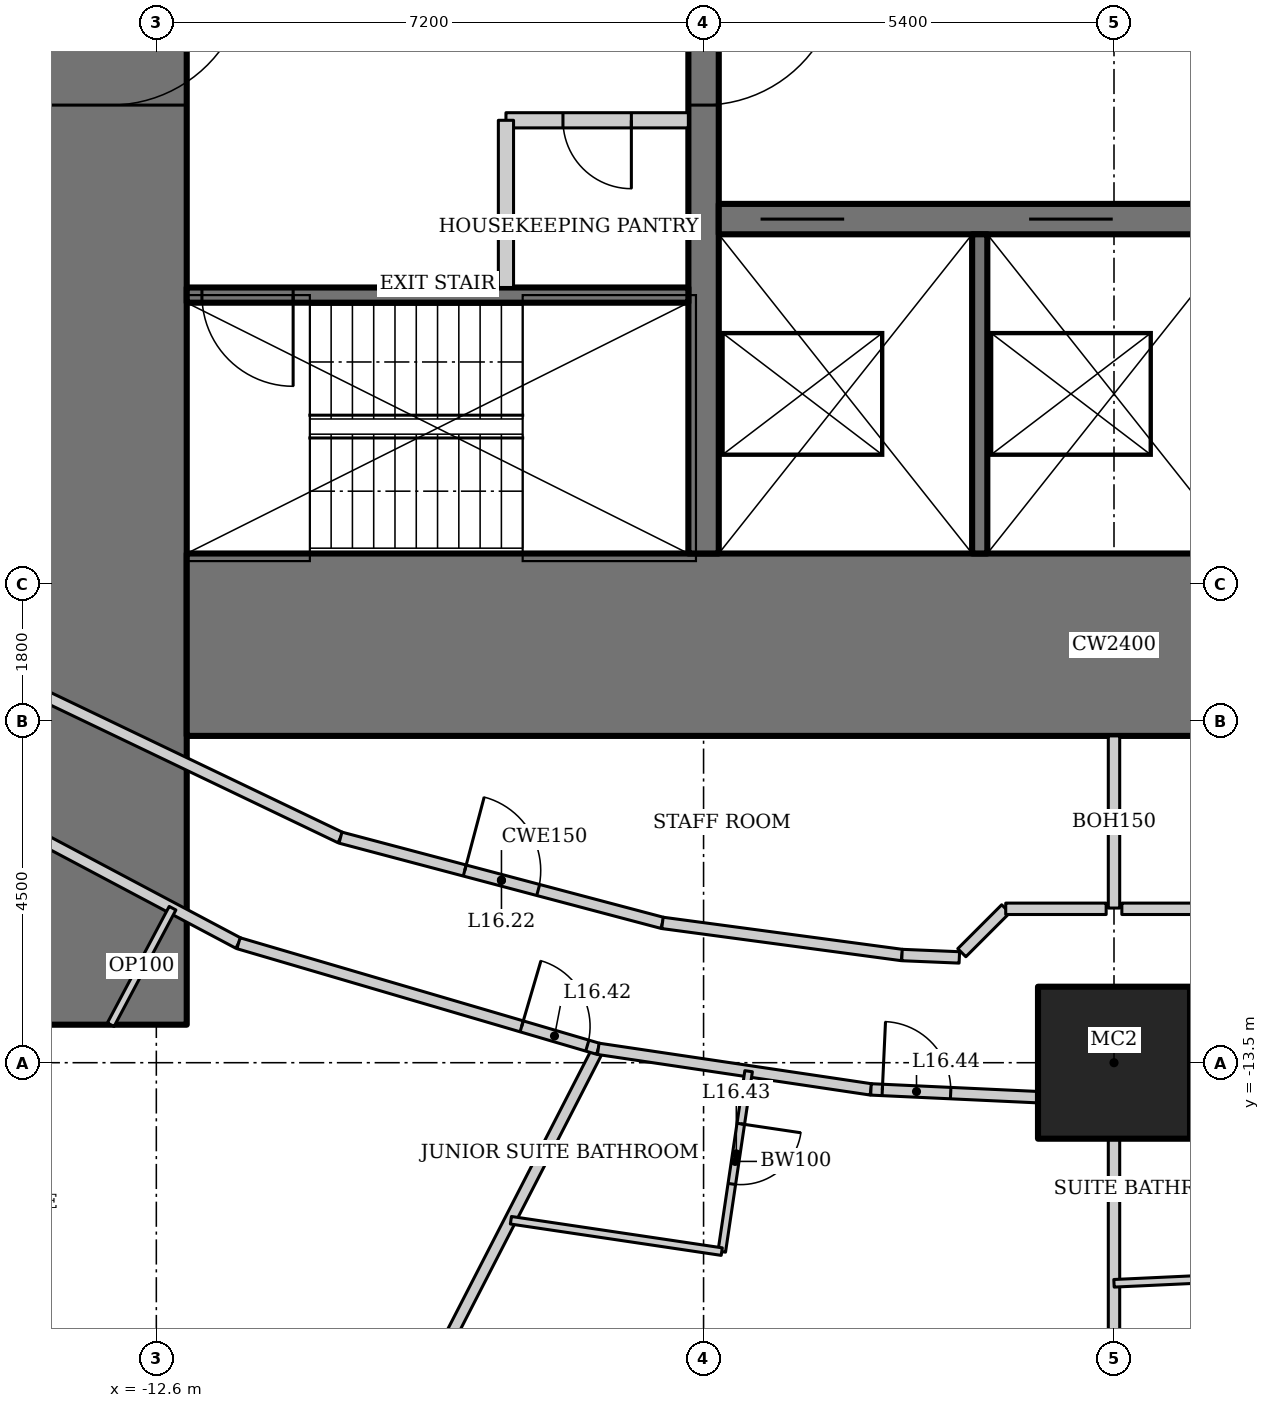
"""IFC4 building model, lengths in metres.
Left out: names, types, materials, properties, quantities, classifications, styles, units other than length and angle.
Written with IfcOpenShell. Run it as: python <this file> out.ifc"""

import sys

from ifc_helpers import new_model, si_unit, direction, frame, frame_2d, origin, origin_2d, place, context, subcontext, project, spatial, rectangle, hollow_rectangle, extrude, element, fill, save


model = new_model("IFC4")
c1 = context("Model", 3, precision=1e-05, world=origin(), true_north=direction((0.0, 1.0)))
c2 = subcontext(c1, "Body", "Model", "MODEL_VIEW")
j1 = project(units=[si_unit("LENGTHUNIT", "METRE"), si_unit("PLANEANGLEUNIT", "RADIAN")], contexts=[c1])
p1 = place(None, origin())
s1 = spatial("IfcSite", under=j1, at=p1, CompositionType="ELEMENT")
p2 = place(p1, origin())
s2 = spatial("IfcBuilding", under=s1, at=p2, CompositionType="ELEMENT")
p3 = place(p2, frame((0.0, 0.0, 73.0)))
s3 = spatial("IfcBuildingStorey", under=s2, at=p3, CompositionType="ELEMENT", Elevation=73.0)
p4 = place(p3, frame((0.0, -13.5, 0.0), z_axis=(0.0, 0.0, 1.0), x_axis=(1.0, 0.0, 0.0)))
e1 = element("IfcColumn", 1, at=p4, inside=s3, PredefinedType="COLUMN", context=c2, shape_type="SweptSolid", body=[
    extrude(hollow_rectangle(XDim=2.0, YDim=2.0, WallThickness=0.17, at=origin_2d()), origin(), (0.0, 0.0, 1.0), 3.6),
])
p5 = place(p3, frame((-13.2, 13.0, 0.0), z_axis=(0.0, 0.0, 1.0), x_axis=(0.0, -1.0, 0.0)))
e2 = element("IfcWall", 2, at=p5, inside=s3, PredefinedType="SHEAR", context=c2, shape_type="SweptSolid", body=[
    extrude(rectangle(XDim=26.0, YDim=2.0, at=frame_2d((13.0, 0.0))), origin(), (0.0, 0.0, 1.0), 3.6),
])
p6 = place(p5, frame((12.1, 0.0, 0.0)))
e3 = element("IfcOpeningElement", 3, at=p6, cuts=e2, PredefinedType="OPENING", context=c2, shape_type="SweptSolid", body=[
    extrude(rectangle(XDim=1.8, YDim=2.1, at=frame_2d((0.9, 1.05))), frame((0.0, 1.01, 0.0), z_axis=(0.0, -1.0, 0.0), x_axis=(1.0, 0.0, 0.0)), (0.0, 0.0, 1.0), 2.02),
])
p7 = place(p3, frame((-12.2, -8.0, 0.0), z_axis=(0.0, 0.0, 1.0), x_axis=(1.0, 0.0, 0.0)))
e4 = element("IfcWall", 4, at=p7, inside=s3, PredefinedType="SHEAR", context=c2, shape_type="SweptSolid", body=[
    extrude(rectangle(XDim=24.4, YDim=2.4, at=frame_2d((12.2, 0.0))), origin(), (0.0, 0.0, 1.0), 3.6),
])
p8 = place(p3, frame((-5.4, 6.8, 0.0), z_axis=(0.0, 0.0, 1.0), x_axis=(0.0, -1.0, 0.0)))
e5 = element("IfcWall", 5, at=p8, inside=s3, PredefinedType="SHEAR", context=c2, shape_type="SweptSolid", body=[
    extrude(rectangle(XDim=13.6, YDim=0.4, at=frame_2d((6.8, 0.0))), origin(), (0.0, 0.0, 1.0), 3.6),
])
p9 = place(p8, frame((5.9, 0.0, 0.0)))
e6 = element("IfcOpeningElement", 6, at=p9, cuts=e5, PredefinedType="OPENING", context=c2, shape_type="SweptSolid", body=[
    extrude(rectangle(XDim=1.8, YDim=2.1, at=frame_2d((0.9, 1.05))), frame((0.0, 0.21, 0.0), z_axis=(0.0, -1.0, 0.0), x_axis=(1.0, 0.0, 0.0)), (0.0, 0.0, 1.0), 0.42),
])
p10 = place(p3, frame((-5.2, -2.4, 0.0), z_axis=(0.0, 0.0, 1.0), x_axis=(1.0, 0.0, 0.0)))
e7 = element("IfcWall", 7, at=p10, inside=s3, PredefinedType="SHEAR", context=c2, shape_type="SweptSolid", body=[
    extrude(rectangle(XDim=10.4, YDim=0.4, at=frame_2d((5.2, 0.0))), origin(), (0.0, 0.0, 1.0), 3.6),
])
p11 = place(p10, frame((0.55, 0.0, 0.0)))
e8 = element("IfcOpeningElement", 8, at=p11, cuts=e7, PredefinedType="OPENING", context=c2, shape_type="SweptSolid", body=[
    extrude(rectangle(XDim=1.1, YDim=2.2, at=frame_2d((0.55, 1.1))), frame((0.0, 0.21, 0.0), z_axis=(0.0, -1.0, 0.0), x_axis=(1.0, 0.0, 0.0)), (0.0, 0.0, 1.0), 0.42),
])
p12 = place(p10, frame((4.083, 0.0, 0.0)))
e9 = element("IfcOpeningElement", 9, at=p12, cuts=e7, PredefinedType="OPENING", context=c2, shape_type="SweptSolid", body=[
    extrude(rectangle(XDim=1.1, YDim=2.2, at=frame_2d((0.55, 1.1))), frame((0.0, 0.21, 0.0), z_axis=(0.0, -1.0, 0.0), x_axis=(1.0, 0.0, 0.0)), (0.0, 0.0, 1.0), 0.42),
])
p13 = place(p10, frame((7.617, 0.0, 0.0)))
e10 = element("IfcOpeningElement", 10, at=p13, cuts=e7, PredefinedType="OPENING", context=c2, shape_type="SweptSolid", body=[
    extrude(rectangle(XDim=1.1, YDim=2.2, at=frame_2d((0.55, 1.1))), frame((0.0, 0.21, 0.0), z_axis=(0.0, -1.0, 0.0), x_axis=(1.0, 0.0, 0.0)), (0.0, 0.0, 1.0), 0.42),
])
p14 = place(p3, frame((-1.767, -2.6, 0.0), z_axis=(0.0, 0.0, 1.0), x_axis=(0.0, -1.0, 0.0)))
e11 = element("IfcWall", 11, at=p14, inside=s3, PredefinedType="SOLIDWALL", context=c2, shape_type="SweptSolid", body=[
    extrude(rectangle(XDim=4.2, YDim=0.2, at=frame_2d((2.1, 0.0))), origin(), (0.0, 0.0, 1.0), 3.6),
])
p15 = place(p3, frame((-5.6, -3.4, 0.0), z_axis=(0.0, 0.0, 1.0), x_axis=(-1.0, 0.0, 0.0)))
e12 = element("IfcWall", 12, at=p15, inside=s3, PredefinedType="SHEAR", context=c2, shape_type="SweptSolid", body=[
    extrude(rectangle(XDim=6.6, YDim=0.2, at=frame_2d((3.3, 0.0))), origin(), (0.0, 0.0, 1.0), 3.6),
])
p16 = place(p15, frame((5.2, 0.0, 0.0)))
e13 = element("IfcOpeningElement", 13, at=p16, cuts=e12, PredefinedType="OPENING", context=c2, shape_type="SweptSolid", body=[
    extrude(rectangle(XDim=1.2, YDim=2.1, at=frame_2d((0.6, 1.05))), frame((0.0, 0.11, 0.0), z_axis=(0.0, -1.0, 0.0), x_axis=(1.0, 0.0, 0.0)), (0.0, 0.0, 1.0), 0.22),
])
p17 = place(p3, frame((-5.6, -1.1, 0.0), z_axis=(0.0, 0.0, 1.0), x_axis=(-1.0, 0.0, 0.0)))
e14 = element("IfcWall", 14, at=p17, inside=s3, PredefinedType="SOLIDWALL", context=c2, shape_type="SweptSolid", body=[
    extrude(rectangle(XDim=2.4, YDim=0.2, at=frame_2d((1.2, 0.0))), origin(), (0.0, 0.0, 1.0), 3.45),
])
p18 = place(p17, frame((0.75, 0.0, 0.0)))
e15 = element("IfcOpeningElement", 15, at=p18, cuts=e14, PredefinedType="OPENING", context=c2, shape_type="SweptSolid", body=[
    extrude(rectangle(XDim=0.9, YDim=2.1, at=frame_2d((0.45, 1.05))), frame((0.0, 0.11, 0.0), z_axis=(0.0, -1.0, 0.0), x_axis=(1.0, 0.0, 0.0)), (0.0, 0.0, 1.0), 0.22),
])
p19 = place(p3, frame((-8.0, -1.1, 0.0), z_axis=(0.0, 0.0, 1.0), x_axis=(0.0, -1.0, 0.0)))
e16 = element("IfcWall", 16, at=p19, inside=s3, PredefinedType="SOLIDWALL", context=c2, shape_type="SweptSolid", body=[
    extrude(rectangle(XDim=2.2, YDim=0.2, at=frame_2d((1.1, 0.0))), origin(), (0.0, 0.0, 1.0), 3.45),
])
p20 = place(p3, frame((-10.912, -21.346, 0.0), z_axis=(0.0, 0.0, 1.0), x_axis=(0.457117602022, 0.889406261458, 0.0)))
e17 = element("IfcWall", 17, at=p20, inside=s3, PredefinedType="PARTITIONING", context=c2, shape_type="SweptSolid", body=[
    extrude(rectangle(XDim=9.027, YDim=0.15, at=frame_2d((4.513, 0.0))), origin(), (0.0, 0.0, 1.0), 2.528),
])
p21 = place(p3, frame((0.0, -22.825, 0.0), z_axis=(0.0, 0.0, 1.0), x_axis=(0.0, 1.0, 0.0)))
e18 = element("IfcWall", 18, at=p21, inside=s3, PredefinedType="PARTITIONING", context=c2, shape_type="SweptSolid", body=[
    extrude(rectangle(XDim=8.825, YDim=0.15, at=frame_2d((4.412, 0.0))), origin(), (0.0, 0.0, 1.0), 2.924),
])
p22 = place(p3, frame((-16.369, -9.354, 0.0), z_axis=(0.0, 0.0, 1.0), x_axis=(0.883334368785, -0.468743419071, 0.0)))
e19 = element("IfcWall", 19, at=p22, inside=s3, PredefinedType="PARTITIONING", context=c2, shape_type="SweptSolid", body=[
    extrude(rectangle(XDim=5.491, YDim=0.15, at=frame_2d((2.746, 0.0))), origin(), (0.0, 0.0, 1.0), 3.45),
])
p23 = place(p3, frame((-11.519, -11.928, 0.0), z_axis=(0.0, 0.0, 1.0), x_axis=(0.959496227294, -0.281721475589, 0.0)))
e20 = element("IfcWall", 20, at=p23, inside=s3, PredefinedType="PARTITIONING", context=c2, shape_type="SweptSolid", body=[
    extrude(rectangle(XDim=4.933, YDim=0.15, at=frame_2d((2.466, 0.0))), origin(), (0.0, 0.0, 1.0), 3.45),
])
p24 = place(p23, frame((3.883, 0.0, 0.0)))
e21 = element("IfcOpeningElement", 21, at=p24, cuts=e20, PredefinedType="OPENING", context=c2, shape_type="SweptSolid", body=[
    extrude(rectangle(XDim=0.9, YDim=2.1, at=frame_2d((0.45, 1.05))), frame((0.0, 0.085, 0.0), z_axis=(0.0, -1.0, 0.0), x_axis=(1.0, 0.0, 0.0)), (0.0, 0.0, 1.0), 0.17),
])
p25 = place(p3, frame((-6.786, -13.317, 0.0), z_axis=(0.0, 0.0, 1.0), x_axis=(0.989107488999, -0.14719502439, 0.0)))
e22 = element("IfcWall", 22, at=p25, inside=s3, PredefinedType="PARTITIONING", context=c2, shape_type="SweptSolid", body=[
    extrude(rectangle(XDim=3.627, YDim=0.15, at=frame_2d((1.814, 0.0))), origin(), (0.0, 0.0, 1.0), 3.45),
])
p26 = place(p3, frame((-3.198, -13.851, 0.0), z_axis=(0.0, 0.0, 1.0), x_axis=(0.998920826789, -0.046445471333, 0.0)))
e23 = element("IfcWall", 23, at=p26, inside=s3, PredefinedType="PARTITIONING", context=c2, shape_type="SweptSolid", body=[
    extrude(rectangle(XDim=3.201, YDim=0.15, at=frame_2d((1.601, 0.0))), origin(), (0.0, 0.0, 1.0), 3.45),
])
p27 = place(p26, frame((0.15, 0.0, 0.0)))
e24 = element("IfcOpeningElement", 24, at=p27, cuts=e23, PredefinedType="OPENING", context=c2, shape_type="SweptSolid", body=[
    extrude(rectangle(XDim=0.9, YDim=2.1, at=frame_2d((0.45, 1.05))), frame((0.0, 0.085, 0.0), z_axis=(0.0, -1.0, 0.0), x_axis=(1.0, 0.0, 0.0)), (0.0, 0.0, 1.0), 0.17),
])
p28 = place(p3, frame((0.0, -14.0, 0.0), z_axis=(0.0, 0.0, 1.0), x_axis=(0.998920826789, 0.046445471333, 0.0)))
e25 = element("IfcWall", 25, at=p28, inside=s3, PredefinedType="PARTITIONING", context=c2, shape_type="SweptSolid", body=[
    extrude(rectangle(XDim=3.201, YDim=0.15, at=frame_2d((1.601, 0.0))), origin(), (0.0, 0.0, 1.0), 3.45),
])
p29 = place(p3, frame((-14.673, -8.385, 0.0), z_axis=(0.0, 0.0, 1.0), x_axis=(0.901869692799, -0.43200816799, 0.0)))
e26 = element("IfcWall", 26, at=p29, inside=s3, PredefinedType="PARTITIONING", context=c2, shape_type="SweptSolid", body=[
    extrude(rectangle(XDim=4.986, YDim=0.15, at=frame_2d((2.493, 0.0))), origin(), (0.0, 0.0, 1.0), 3.45),
])
p30 = place(p3, frame((-10.177, -10.539, 0.0), z_axis=(0.0, 0.0, 1.0), x_axis=(0.966672790407, -0.256015070428, 0.0)))
e27 = element("IfcWall", 27, at=p30, inside=s3, PredefinedType="PARTITIONING", context=c2, shape_type="SweptSolid", body=[
    extrude(rectangle(XDim=4.382, YDim=0.15, at=frame_2d((2.191, 0.0))), origin(), (0.0, 0.0, 1.0), 3.45),
])
p31 = place(p30, frame((1.691, 0.0, 0.0)))
e28 = element("IfcOpeningElement", 28, at=p31, cuts=e27, PredefinedType="OPENING", context=c2, shape_type="SweptSolid", body=[
    extrude(rectangle(XDim=1.0, YDim=2.1, at=frame_2d((0.5, 1.05))), frame((0.0, 0.085, 0.0), z_axis=(0.0, -1.0, 0.0), x_axis=(1.0, 0.0, 0.0)), (0.0, 0.0, 1.0), 0.17),
])
p32 = place(p3, frame((-5.941, -11.66, 0.0), z_axis=(0.0, 0.0, 1.0), x_axis=(0.991129053928, -0.13290296633, 0.0)))
e29 = element("IfcWall", 29, at=p32, inside=s3, PredefinedType="PARTITIONING", context=c2, shape_type="SweptSolid", body=[
    extrude(rectangle(XDim=3.18, YDim=0.15, at=frame_2d((1.59, 0.0))), origin(), (0.0, 0.0, 1.0), 3.45),
])
p33 = place(p3, frame((-4.807, -13.612, 0.0), z_axis=(0.0, 0.0, 1.0), x_axis=(-0.147201193874, -0.989106570862, 0.0)))
e30 = element("IfcWall", 30, at=p33, inside=s3, PredefinedType="PARTITIONING", context=c2, shape_type="SweptSolid", body=[
    extrude(rectangle(XDim=2.4, YDim=0.1, at=frame_2d((1.2, 0.0))), origin(), (0.0, 0.0, 1.0), 3.45),
])
p34 = place(p33, frame((0.7, 0.0, 0.0)))
e31 = element("IfcOpeningElement", 31, at=p34, cuts=e30, PredefinedType="OPENING", context=c2, shape_type="SweptSolid", body=[
    extrude(rectangle(XDim=0.8, YDim=2.1, at=frame_2d((0.4, 1.05))), frame((0.0, 0.06, 0.0), z_axis=(0.0, -1.0, 0.0), x_axis=(1.0, 0.0, 0.0)), (0.0, 0.0, 1.0), 0.12),
])
p35 = place(p3, frame((-5.161, -15.986, 0.0), z_axis=(0.0, 0.0, 1.0), x_axis=(-0.98910744157, 0.147195343104, 0.0)))
e32 = element("IfcWall", 32, at=p35, inside=s3, PredefinedType="PARTITIONING", context=c2, shape_type="SweptSolid", body=[
    extrude(rectangle(XDim=2.805, YDim=0.1, at=frame_2d((1.402, 0.0))), origin(), (0.0, 0.0, 1.0), 3.45),
])
p36 = place(p3, frame((2.109, -16.304, 0.0), z_axis=(0.0, 0.0, 1.0), x_axis=(-0.998919337223, -0.04647749694, 0.0)))
e33 = element("IfcWall", 33, at=p36, inside=s3, PredefinedType="PARTITIONING", context=c2, shape_type="SweptSolid", body=[
    extrude(rectangle(XDim=2.112, YDim=0.1, at=frame_2d((1.056, 0.0))), origin(), (0.0, 0.0, 1.0), 3.45),
])
p37 = place(p3, frame((-13.2, -13.0, 0.0), z_axis=(0.0, 0.0, 1.0), x_axis=(0.46874717052, 0.88333237806, 0.0)))
e34 = element("IfcWall", 34, at=p37, inside=s3, PredefinedType="PARTITIONING", context=c2, shape_type="SweptSolid", body=[
    extrude(rectangle(XDim=1.735, YDim=0.1, at=frame_2d((0.868, 0.0))), origin(), (0.0, 0.0, 1.0), 3.45),
])
p38 = place(p3, frame((-2.79, -12.083, 0.0), z_axis=(0.0, 0.0, 1.0), x_axis=(0.999116751279, -0.042020439232, 0.0)))
e35 = element("IfcWall", 35, at=p38, inside=s3, PredefinedType="PARTITIONING", context=c2, shape_type="SweptSolid", body=[
    extrude(rectangle(XDim=0.755, YDim=0.15, at=frame_2d((0.378, 0.0))), origin(), (0.0, 0.0, 1.0), 3.45),
])
p39 = place(p3, frame((0.0, -9.2, 0.0), z_axis=(0.0, 0.0, 1.0), x_axis=(0.0, -1.0, 0.0)))
e36 = element("IfcWall", 36, at=p39, inside=s3, PredefinedType="PARTITIONING", context=c2, shape_type="SweptSolid", body=[
    extrude(rectangle(XDim=2.265, YDim=0.15, at=frame_2d((1.133, 0.0))), origin(), (0.0, 0.0, 1.0), 3.044),
])
p40 = place(p3, frame((-2.002, -12.053, 0.0), z_axis=(0.0, 0.0, 1.0), x_axis=(0.707256164678, 0.706957366129, 0.0)))
e37 = element("IfcWall", 37, at=p40, inside=s3, PredefinedType="PARTITIONING", context=c2, shape_type="SweptSolid", body=[
    extrude(rectangle(XDim=0.817, YDim=0.15, at=frame_2d((0.409, 0.0))), origin(), (0.0, 0.0, 1.0), 3.45),
])
for number, where, z_axis, x_axis in (
    (38, (-1.425, -11.475, 0.0), (0.0, 0.0, 1.0), (1.0, 0.0, 0.0)),
    (39, (0.103, -11.475, 0.0), (0.0, 0.0, 1.0), (1.0, 0.0, 0.0)),
):
    element("IfcWall", number, at=place(p3, frame(where, z_axis=z_axis, x_axis=x_axis)), inside=s3, PredefinedType="PARTITIONING", context=c2, shape_type="SweptSolid", body=[
        extrude(rectangle(XDim=1.321, YDim=0.15, at=frame_2d((0.661, 0.0))), origin(), (0.0, 0.0, 1.0), 3.45),
    ])
p41 = place(p18, origin())
e40 = element("IfcDoor", 40, at=p41, inside=s3, OperationType="SINGLE_SWING_LEFT", PredefinedType="DOOR", context=c2, shape_type="SweptSolid", body=[
    extrude(rectangle(XDim=0.9, YDim=2.1, at=frame_2d((0.45, 1.05))), frame((0.0, 0.025, 0.0), z_axis=(0.0, -1.0, 0.0), x_axis=(1.0, 0.0, 0.0)), (0.0, 0.0, 1.0), 0.05),
])
fill(e15, e40)
p42 = place(p9, origin())
e41 = element("IfcDoor", 41, at=p42, inside=s3, OperationType="DOUBLE_DOOR_DOUBLE_SWING", PredefinedType="DOOR", context=c2, shape_type="SweptSolid", body=[
    extrude(rectangle(XDim=1.8, YDim=2.1, at=frame_2d((0.9, 1.05))), frame((0.0, 0.025, 0.0), z_axis=(0.0, -1.0, 0.0), x_axis=(1.0, 0.0, 0.0)), (0.0, 0.0, 1.0), 0.05),
])
fill(e6, e41)
p43 = place(p16, origin())
e42 = element("IfcDoor", 42, at=p43, inside=s3, OperationType="SINGLE_SWING_RIGHT", PredefinedType="DOOR", context=c2, shape_type="SweptSolid", body=[
    extrude(rectangle(XDim=1.2, YDim=2.1, at=frame_2d((0.6, 1.05))), frame((0.0, 0.025, 0.0), z_axis=(0.0, -1.0, 0.0), x_axis=(1.0, 0.0, 0.0)), (0.0, 0.0, 1.0), 0.05),
])
fill(e13, e42)
p44 = place(p6, origin())
e43 = element("IfcDoor", 43, at=p44, inside=s3, OperationType="DOUBLE_DOOR_DOUBLE_SWING", PredefinedType="DOOR", context=c2, shape_type="SweptSolid", body=[
    extrude(rectangle(XDim=1.8, YDim=2.1, at=frame_2d((0.9, 1.05))), frame((0.0, 0.025, 0.0), z_axis=(0.0, -1.0, 0.0), x_axis=(1.0, 0.0, 0.0)), (0.0, 0.0, 1.0), 0.05),
])
fill(e3, e43)
p45 = place(p11, origin())
e44 = element("IfcDoor", 44, at=p45, inside=s3, OperationType="DOUBLE_DOOR_SLIDING", PredefinedType="DOOR", context=c2, shape_type="SweptSolid", body=[
    extrude(rectangle(XDim=1.1, YDim=2.2, at=frame_2d((0.55, 1.1))), frame((0.0, 0.025, 0.0), z_axis=(0.0, -1.0, 0.0), x_axis=(1.0, 0.0, 0.0)), (0.0, 0.0, 1.0), 0.05),
])
fill(e8, e44)
p46 = place(p12, origin())
e45 = element("IfcDoor", 45, at=p46, inside=s3, OperationType="DOUBLE_DOOR_SLIDING", PredefinedType="DOOR", context=c2, shape_type="SweptSolid", body=[
    extrude(rectangle(XDim=1.1, YDim=2.2, at=frame_2d((0.55, 1.1))), frame((0.0, 0.025, 0.0), z_axis=(0.0, -1.0, 0.0), x_axis=(1.0, 0.0, 0.0)), (0.0, 0.0, 1.0), 0.05),
])
fill(e9, e45)
p47 = place(p31, origin())
e46 = element("IfcDoor", 46, at=p47, inside=s3, OperationType="SINGLE_SWING_LEFT", PredefinedType="DOOR", context=c2, shape_type="SweptSolid", body=[
    extrude(rectangle(XDim=1.0, YDim=2.1, at=frame_2d((0.5, 1.05))), frame((0.0, 0.025, 0.0), z_axis=(0.0, -1.0, 0.0), x_axis=(1.0, 0.0, 0.0)), (0.0, 0.0, 1.0), 0.05),
])
fill(e28, e46)
p48 = place(p24, origin())
e47 = element("IfcDoor", 47, at=p48, inside=s3, OperationType="SINGLE_SWING_LEFT", PredefinedType="DOOR", context=c2, shape_type="SweptSolid", body=[
    extrude(rectangle(XDim=0.9, YDim=2.1, at=frame_2d((0.45, 1.05))), frame((0.0, 0.025, 0.0), z_axis=(0.0, -1.0, 0.0), x_axis=(1.0, 0.0, 0.0)), (0.0, 0.0, 1.0), 0.05),
])
fill(e21, e47)
p49 = place(p34, origin())
e48 = element("IfcDoor", 48, at=p49, inside=s3, OperationType="SINGLE_SWING_LEFT", PredefinedType="DOOR", context=c2, shape_type="SweptSolid", body=[
    extrude(rectangle(XDim=0.8, YDim=2.1, at=frame_2d((0.4, 1.05))), frame((0.0, 0.025, 0.0), z_axis=(0.0, -1.0, 0.0), x_axis=(1.0, 0.0, 0.0)), (0.0, 0.0, 1.0), 0.05),
])
fill(e31, e48)
p50 = place(p27, origin())
e49 = element("IfcDoor", 49, at=p50, inside=s3, OperationType="SINGLE_SWING_LEFT", PredefinedType="DOOR", context=c2, shape_type="SweptSolid", body=[
    extrude(rectangle(XDim=0.9, YDim=2.1, at=frame_2d((0.45, 1.05))), frame((0.0, 0.025, 0.0), z_axis=(0.0, -1.0, 0.0), x_axis=(1.0, 0.0, 0.0)), (0.0, 0.0, 1.0), 0.05),
])
fill(e24, e49)
save(model, sys.argv[1])
